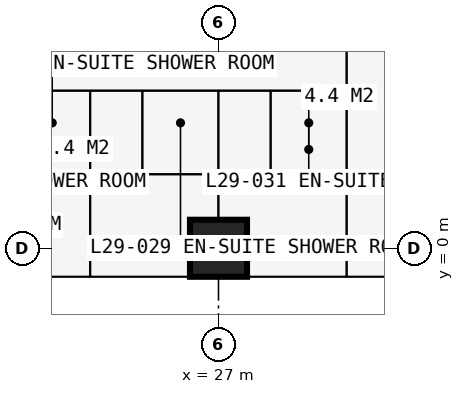
"""IFC4 building model, lengths in metres.
Left out: names, types, materials, properties, quantities, classifications, styles, units other than length and angle.
Written with IfcOpenShell. Run it as: python <this file> out.ifc"""

import sys

from ifc_helpers import new_model, si_unit, direction, frame, frame_2d, origin, origin_2d, place, context, subcontext, project, spatial, rectangle, extrude, element, fill, save


model = new_model("IFC4")
c1 = context("Model", 3, precision=1e-05, world=origin(), true_north=direction((0.0, 1.0)))
c2 = subcontext(c1, "Body", "Model", "MODEL_VIEW")
j1 = project(units=[si_unit("LENGTHUNIT", "METRE"), si_unit("PLANEANGLEUNIT", "RADIAN")], contexts=[c1])
p1 = place(None, origin())
s1 = spatial("IfcSite", under=j1, at=p1, CompositionType="ELEMENT")
p2 = place(p1, origin())
s2 = spatial("IfcBuilding", under=s1, at=p2, CompositionType="ELEMENT")
p3 = place(p2, frame((0.0, 0.0, 108.9)))
s3 = spatial("IfcBuildingStorey", under=s2, at=p3, CompositionType="ELEMENT", Elevation=108.9)
p4 = place(p3, frame((27.0, 0.0, 0.0), z_axis=(0.0, 0.0, 1.0), x_axis=(1.0, 0.0, 0.0)))
e1 = element("IfcColumn", 1, at=p4, inside=s3, PredefinedType="COLUMN", context=c2, shape_type="SweptSolid", body=[
    extrude(rectangle(XDim=1.5, YDim=1.5, at=origin_2d()), origin(), (0.0, 0.0, 1.0), 3.6),
])
p5 = place(p3, frame((27.0, -0.75, 0.0), z_axis=(0.0, 0.0, 1.0), x_axis=(-1.0, 0.0, 0.0)))
e2 = element("IfcWall", 2, at=p5, inside=s3, PredefinedType="SOLIDWALL", context=c2, shape_type="SweptSolid", body=[
    extrude(rectangle(XDim=6.75, YDim=0.15, at=frame_2d((3.375, 0.0))), origin(), (0.0, 0.0, 1.0), 3.375),
])
p6 = place(p5, frame((0.863, 0.0, 0.0)))
e3 = element("IfcOpeningElement", 3, at=p6, cuts=e2, PredefinedType="OPENING", context=c2, shape_type="SweptSolid", body=[
    extrude(rectangle(XDim=1.0, YDim=2.2, at=frame_2d((0.5, 1.1))), frame((0.0, 0.085, 0.0), z_axis=(0.0, -1.0, 0.0), x_axis=(1.0, 0.0, 0.0)), (0.0, 0.0, 1.0), 0.17),
])
p7 = place(p5, frame((1.975, 0.0, 0.9)))
e4 = element("IfcOpeningElement", 4, at=p7, cuts=e2, PredefinedType="OPENING", context=c2, shape_type="SweptSolid", body=[
    extrude(rectangle(XDim=1.2, YDim=1.8, at=frame_2d((0.6, 0.9))), frame((0.0, 0.085, 0.0), z_axis=(0.0, -1.0, 0.0), x_axis=(1.0, 0.0, 0.0)), (0.0, 0.0, 1.0), 0.17),
])
p8 = place(p5, frame((4.887, 0.0, 0.0)))
e5 = element("IfcOpeningElement", 5, at=p8, cuts=e2, PredefinedType="OPENING", context=c2, shape_type="SweptSolid", body=[
    extrude(rectangle(XDim=1.0, YDim=2.2, at=frame_2d((0.5, 1.1))), frame((0.0, 0.085, 0.0), z_axis=(0.0, -1.0, 0.0), x_axis=(1.0, 0.0, 0.0)), (0.0, 0.0, 1.0), 0.17),
])
p9 = place(p5, frame((3.575, 0.0, 0.9)))
e6 = element("IfcOpeningElement", 6, at=p9, cuts=e2, PredefinedType="OPENING", context=c2, shape_type="SweptSolid", body=[
    extrude(rectangle(XDim=1.2, YDim=1.8, at=frame_2d((0.6, 0.9))), frame((0.0, 0.085, 0.0), z_axis=(0.0, -1.0, 0.0), x_axis=(1.0, 0.0, 0.0)), (0.0, 0.0, 1.0), 0.17),
])
p10 = place(p3, frame((23.625, -0.85, 0.0), z_axis=(0.0, 0.0, 1.0), x_axis=(0.0, -1.0, 0.0)))
e7 = element("IfcWall", 7, at=p10, inside=s3, PredefinedType="USERDEFINED", context=c2, shape_type="SweptSolid", body=[
    extrude(rectangle(XDim=2.2, YDim=1.0, at=frame_2d((1.1, 0.0))), origin(), (0.0, 0.0, 1.0), 0.9),
])
p11 = place(p3, frame((6.75, 4.15, 0.0), z_axis=(0.0, 0.0, 1.0), x_axis=(1.0, 0.0, 0.0)))
e8 = element("IfcWall", 8, at=p11, inside=s3, PredefinedType="PARTITIONING", context=c2, shape_type="SweptSolid", body=[
    extrude(rectangle(XDim=23.625, YDim=0.1, at=frame_2d((11.812, 0.0))), origin(), (0.0, 0.0, 1.0), 3.375),
])
p12 = place(p11, frame((0.2, 0.0, 0.0)))
e9 = element("IfcOpeningElement", 9, at=p12, cuts=e8, PredefinedType="OPENING", context=c2, shape_type="SweptSolid", body=[
    extrude(rectangle(XDim=0.95, YDim=2.2, at=frame_2d((0.475, 1.1))), frame((0.0, 0.06, 0.0), z_axis=(0.0, -1.0, 0.0), x_axis=(1.0, 0.0, 0.0)), (0.0, 0.0, 1.0), 0.12),
])
p13 = place(p11, frame((3.625, 0.0, 0.0)))
e10 = element("IfcOpeningElement", 10, at=p13, cuts=e8, PredefinedType="OPENING", context=c2, shape_type="SweptSolid", body=[
    extrude(rectangle(XDim=0.95, YDim=2.2, at=frame_2d((0.475, 1.1))), frame((0.0, 0.06, 0.0), z_axis=(0.0, -1.0, 0.0), x_axis=(1.0, 0.0, 0.0)), (0.0, 0.0, 1.0), 0.12),
])
p14 = place(p11, frame((7.0, 0.0, 0.0)))
e11 = element("IfcOpeningElement", 11, at=p14, cuts=e8, PredefinedType="OPENING", context=c2, shape_type="SweptSolid", body=[
    extrude(rectangle(XDim=0.95, YDim=2.2, at=frame_2d((0.475, 1.1))), frame((0.0, 0.06, 0.0), z_axis=(0.0, -1.0, 0.0), x_axis=(1.0, 0.0, 0.0)), (0.0, 0.0, 1.0), 0.12),
])
p15 = place(p11, frame((10.375, 0.0, 0.0)))
e12 = element("IfcOpeningElement", 12, at=p15, cuts=e8, PredefinedType="OPENING", context=c2, shape_type="SweptSolid", body=[
    extrude(rectangle(XDim=0.95, YDim=2.2, at=frame_2d((0.475, 1.1))), frame((0.0, 0.06, 0.0), z_axis=(0.0, -1.0, 0.0), x_axis=(1.0, 0.0, 0.0)), (0.0, 0.0, 1.0), 0.12),
])
p16 = place(p11, frame((13.75, 0.0, 0.0)))
e13 = element("IfcOpeningElement", 13, at=p16, cuts=e8, PredefinedType="OPENING", context=c2, shape_type="SweptSolid", body=[
    extrude(rectangle(XDim=0.95, YDim=2.2, at=frame_2d((0.475, 1.1))), frame((0.0, 0.06, 0.0), z_axis=(0.0, -1.0, 0.0), x_axis=(1.0, 0.0, 0.0)), (0.0, 0.0, 1.0), 0.12),
])
p17 = place(p11, frame((17.125, 0.0, 0.0)))
e14 = element("IfcOpeningElement", 14, at=p17, cuts=e8, PredefinedType="OPENING", context=c2, shape_type="SweptSolid", body=[
    extrude(rectangle(XDim=0.95, YDim=2.2, at=frame_2d((0.475, 1.1))), frame((0.0, 0.06, 0.0), z_axis=(0.0, -1.0, 0.0), x_axis=(1.0, 0.0, 0.0)), (0.0, 0.0, 1.0), 0.12),
])
p18 = place(p11, frame((20.5, 0.0, 0.0)))
e15 = element("IfcOpeningElement", 15, at=p18, cuts=e8, PredefinedType="OPENING", context=c2, shape_type="SweptSolid", body=[
    extrude(rectangle(XDim=0.95, YDim=2.2, at=frame_2d((0.475, 1.1))), frame((0.0, 0.06, 0.0), z_axis=(0.0, -1.0, 0.0), x_axis=(1.0, 0.0, 0.0)), (0.0, 0.0, 1.0), 0.12),
])
p19 = place(p3, frame((21.625, 1.95, 0.0), z_axis=(0.0, 0.0, 1.0), x_axis=(1.0, 0.0, 0.0)))
e16 = element("IfcWall", 16, at=p19, inside=s3, PredefinedType="PARTITIONING", context=c2, shape_type="SweptSolid", body=[
    extrude(rectangle(XDim=2.0, YDim=0.1, at=frame_2d((1.0, 0.0))), origin(), (0.0, 0.0, 1.0), 3.375),
])
p20 = place(p3, frame((23.625, -0.734, 0.0), z_axis=(0.0, 0.0, 1.0), x_axis=(0.0, 1.0, 0.0)))
e17 = element("IfcWall", 17, at=p20, inside=s3, PredefinedType="PARTITIONING", context=c2, shape_type="SweptSolid", body=[
    extrude(rectangle(XDim=4.884, YDim=0.175, at=frame_2d((2.442, 0.0))), origin(), (0.0, 0.0, 1.0), 3.375),
])
p21 = place(p3, frame((25.0, 1.95, 0.0), z_axis=(0.0, 0.0, 1.0), x_axis=(0.0, 1.0, 0.0)))
e18 = element("IfcWall", 18, at=p21, inside=s3, PredefinedType="PARTITIONING", context=c2, shape_type="SweptSolid", body=[
    extrude(rectangle(XDim=2.2, YDim=0.1, at=frame_2d((1.1, 0.0))), origin(), (0.0, 0.0, 1.0), 3.375),
])
p22 = place(p21, frame((0.65, 0.0, 0.0)))
e19 = element("IfcOpeningElement", 19, at=p22, cuts=e18, PredefinedType="OPENING", context=c2, shape_type="SweptSolid", body=[
    extrude(rectangle(XDim=0.9, YDim=2.2, at=frame_2d((0.45, 1.1))), frame((0.0, 0.06, 0.0), z_axis=(0.0, -1.0, 0.0), x_axis=(1.0, 0.0, 0.0)), (0.0, 0.0, 1.0), 0.12),
])
p23 = place(p3, frame((25.0, 1.95, 0.0), z_axis=(0.0, 0.0, 1.0), x_axis=(1.0, 0.0, 0.0)))
e20 = element("IfcWall", 20, at=p23, inside=s3, PredefinedType="PARTITIONING", context=c2, shape_type="SweptSolid", body=[
    extrude(rectangle(XDim=2.0, YDim=0.1, at=frame_2d((1.0, 0.0))), origin(), (0.0, 0.0, 1.0), 3.375),
])
p24 = place(p3, frame((27.0, -0.734, 0.0), z_axis=(0.0, 0.0, 1.0), x_axis=(0.0, 1.0, 0.0)))
e21 = element("IfcWall", 21, at=p24, inside=s3, PredefinedType="PARTITIONING", context=c2, shape_type="SweptSolid", body=[
    extrude(rectangle(XDim=4.884, YDim=0.175, at=frame_2d((2.442, 0.0))), origin(), (0.0, 0.0, 1.0), 2.61),
])
p25 = place(p3, frame((28.375, 1.95, 0.0), z_axis=(0.0, 0.0, 1.0), x_axis=(0.0, 1.0, 0.0)))
e22 = element("IfcWall", 22, at=p25, inside=s3, PredefinedType="PARTITIONING", context=c2, shape_type="SweptSolid", body=[
    extrude(rectangle(XDim=2.2, YDim=0.1, at=frame_2d((1.1, 0.0))), origin(), (0.0, 0.0, 1.0), 3.375),
])
p26 = place(p25, frame((0.65, 0.0, 0.0)))
e23 = element("IfcOpeningElement", 23, at=p26, cuts=e22, PredefinedType="OPENING", context=c2, shape_type="SweptSolid", body=[
    extrude(rectangle(XDim=0.9, YDim=2.2, at=frame_2d((0.45, 1.1))), frame((0.0, 0.06, 0.0), z_axis=(0.0, -1.0, 0.0), x_axis=(1.0, 0.0, 0.0)), (0.0, 0.0, 1.0), 0.12),
])
p27 = place(p3, frame((28.375, 1.95, 0.0), z_axis=(0.0, 0.0, 1.0), x_axis=(1.0, 0.0, 0.0)))
e24 = element("IfcWall", 24, at=p27, inside=s3, PredefinedType="PARTITIONING", context=c2, shape_type="SweptSolid", body=[
    extrude(rectangle(XDim=2.0, YDim=0.1, at=frame_2d((1.0, 0.0))), origin(), (0.0, 0.0, 1.0), 3.375),
])
p28 = place(p3, frame((30.375, -0.734, 0.0), z_axis=(0.0, 0.0, 1.0), x_axis=(0.0, 1.0, 0.0)))
e25 = element("IfcWall", 25, at=p28, inside=s3, PredefinedType="PARTITIONING", context=c2, shape_type="SweptSolid", body=[
    extrude(rectangle(XDim=12.034, YDim=0.15, at=frame_2d((6.017, 0.0))), origin(), (0.0, 0.0, 1.0), 3.375),
])
p29 = place(p6, origin())
e26 = element("IfcDoor", 26, at=p29, inside=s3, OperationType="SINGLE_SWING_LEFT", PredefinedType="DOOR", context=c2, shape_type="SweptSolid", body=[
    extrude(rectangle(XDim=1.0, YDim=2.2, at=frame_2d((0.5, 1.1))), frame((0.0, 0.025, 0.0), z_axis=(0.0, -1.0, 0.0), x_axis=(1.0, 0.0, 0.0)), (0.0, 0.0, 1.0), 0.05),
])
fill(e3, e26)
p30 = place(p7, origin())
e27 = element("IfcWindow", 27, at=p30, inside=s3, PartitioningType="SINGLE_PANEL", PredefinedType="WINDOW", context=c2, shape_type="SweptSolid", body=[
    extrude(rectangle(XDim=1.2, YDim=1.8, at=frame_2d((0.6, 0.9))), frame((0.0, 0.03, 0.0), z_axis=(0.0, -1.0, 0.0), x_axis=(1.0, 0.0, 0.0)), (0.0, 0.0, 1.0), 0.06),
])
fill(e4, e27)
p31 = place(p9, origin())
e28 = element("IfcWindow", 28, at=p31, inside=s3, PartitioningType="SINGLE_PANEL", PredefinedType="WINDOW", context=c2, shape_type="SweptSolid", body=[
    extrude(rectangle(XDim=1.2, YDim=1.8, at=frame_2d((0.6, 0.9))), frame((0.0, 0.03, 0.0), z_axis=(0.0, -1.0, 0.0), x_axis=(1.0, 0.0, 0.0)), (0.0, 0.0, 1.0), 0.06),
])
fill(e6, e28)
p32 = place(p17, origin())
e29 = element("IfcDoor", 29, at=p32, inside=s3, OperationType="SINGLE_SWING_LEFT", PredefinedType="DOOR", context=c2, shape_type="SweptSolid", body=[
    extrude(rectangle(XDim=0.95, YDim=2.2, at=frame_2d((0.475, 1.1))), frame((0.0, 0.025, 0.0), z_axis=(0.0, -1.0, 0.0), x_axis=(1.0, 0.0, 0.0)), (0.0, 0.0, 1.0), 0.05),
])
fill(e14, e29)
p33 = place(p22, origin())
e30 = element("IfcDoor", 30, at=p33, inside=s3, OperationType="SINGLE_SWING_RIGHT", PredefinedType="DOOR", context=c2, shape_type="SweptSolid", body=[
    extrude(rectangle(XDim=0.9, YDim=2.2, at=frame_2d((0.45, 1.1))), frame((0.0, 0.025, 0.0), z_axis=(0.0, -1.0, 0.0), x_axis=(1.0, 0.0, 0.0)), (0.0, 0.0, 1.0), 0.05),
])
fill(e19, e30)
p34 = place(p18, origin())
e31 = element("IfcDoor", 31, at=p34, inside=s3, OperationType="SINGLE_SWING_LEFT", PredefinedType="DOOR", context=c2, shape_type="SweptSolid", body=[
    extrude(rectangle(XDim=0.95, YDim=2.2, at=frame_2d((0.475, 1.1))), frame((0.0, 0.025, 0.0), z_axis=(0.0, -1.0, 0.0), x_axis=(1.0, 0.0, 0.0)), (0.0, 0.0, 1.0), 0.05),
])
fill(e15, e31)
p35 = place(p26, origin())
e32 = element("IfcDoor", 32, at=p35, inside=s3, OperationType="SINGLE_SWING_RIGHT", PredefinedType="DOOR", context=c2, shape_type="SweptSolid", body=[
    extrude(rectangle(XDim=0.9, YDim=2.2, at=frame_2d((0.45, 1.1))), frame((0.0, 0.025, 0.0), z_axis=(0.0, -1.0, 0.0), x_axis=(1.0, 0.0, 0.0)), (0.0, 0.0, 1.0), 0.05),
])
fill(e23, e32)
save(model, sys.argv[1])
